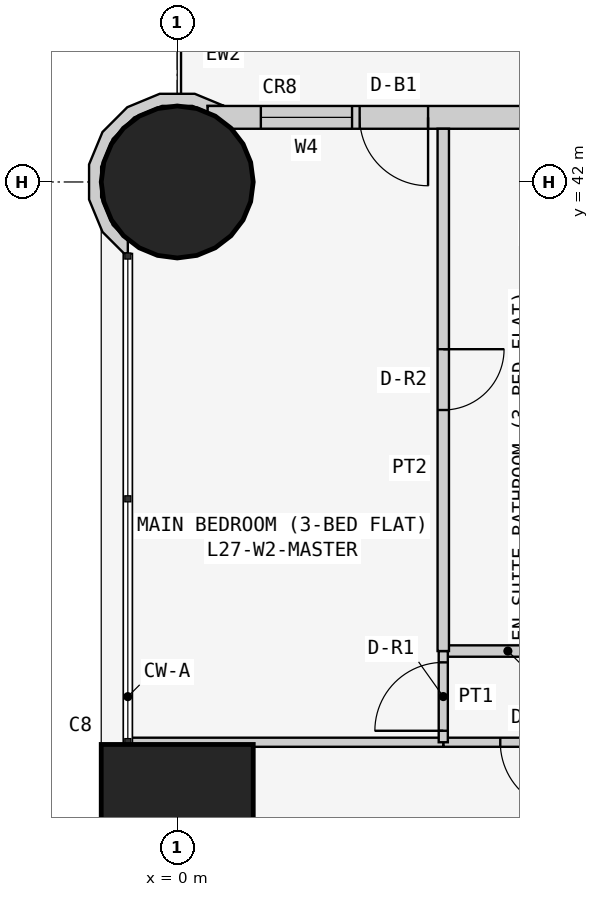
"""IFC4 building model, lengths in metres.
Left out: names, types, materials, properties, quantities, classifications, styles, units other than length and angle.
Written with IfcOpenShell. Run it as: python <this file> out.ifc"""

import sys

from ifc_helpers import new_model, si_unit, direction, frame, frame_2d, origin, origin_2d, place, context, subcontext, project, spatial, polyline, rectangle, circle, outline, extrude, element, fill, save


model = new_model("IFC4")
c1 = context("Model", 3, precision=1e-05, world=origin(), true_north=direction((0.0, 1.0)))
c2 = subcontext(c1, "Body", "Model", "MODEL_VIEW")
j1 = project(units=[si_unit("LENGTHUNIT", "METRE"), si_unit("PLANEANGLEUNIT", "RADIAN")], contexts=[c1])
p1 = place(None, origin())
s1 = spatial("IfcSite", under=j1, at=p1, CompositionType="ELEMENT")
p2 = place(p1, origin())
s2 = spatial("IfcBuilding", under=s1, at=p2, CompositionType="ELEMENT")
p3 = place(p2, frame((0.0, 0.0, 108.9)))
s3 = spatial("IfcBuildingStorey", under=s2, at=p3, CompositionType="ELEMENT", Elevation=108.9)
p4 = place(p3, frame((0.0, 33.6, 0.0), z_axis=(0.0, 0.0, 1.0), x_axis=(1.0, 0.0, 0.0)))
e1 = element("IfcColumn", 1, at=p4, inside=s3, PredefinedType="COLUMN", context=c2, shape_type="SweptSolid", body=[
    extrude(rectangle(XDim=2.0, YDim=2.0, at=origin_2d()), origin(), (0.0, 0.0, 1.0), 3.6),
])
p5 = place(p3, frame((0.0, 42.0, 0.0), z_axis=(0.0, 0.0, 1.0), x_axis=(1.0, 0.0, 0.0)))
e2 = element("IfcColumn", 2, at=p5, inside=s3, PredefinedType="COLUMN", context=c2, shape_type="SweptSolid", body=[
    extrude(circle(Radius=1.0, at=origin_2d()), origin(), (0.0, 0.0, 1.0), 3.6),
])
p6 = place(p3, frame((15.8, 42.85, 0.0), z_axis=(0.0, 0.0, 1.0), x_axis=(-1.0, 0.0, 0.0)))
e3 = element("IfcWall", 3, at=p6, inside=s3, PredefinedType="SOLIDWALL", context=c2, shape_type="SweptSolid", body=[
    extrude(rectangle(XDim=15.4, YDim=0.3, at=frame_2d((7.7, 0.0))), origin(), (0.0, 0.0, 1.0), 3.45),
])
p7 = place(p6, frame((1.2, 0.0, 0.9)))
e4 = element("IfcOpeningElement", 4, at=p7, cuts=e3, PredefinedType="OPENING", context=c2, shape_type="SweptSolid", body=[
    extrude(rectangle(XDim=1.8, YDim=1.5, at=frame_2d((0.9, 0.75))), frame((0.0, 0.16, 0.0), z_axis=(0.0, -1.0, 0.0), x_axis=(1.0, 0.0, 0.0)), (0.0, 0.0, 1.0), 0.32),
])
p8 = place(p6, frame((4.95, 0.0, 1.5)))
e5 = element("IfcOpeningElement", 5, at=p8, cuts=e3, PredefinedType="OPENING", context=c2, shape_type="SweptSolid", body=[
    extrude(rectangle(XDim=0.9, YDim=0.7, at=frame_2d((0.45, 0.35))), frame((0.0, 0.16, 0.0), z_axis=(0.0, -1.0, 0.0), x_axis=(1.0, 0.0, 0.0)), (0.0, 0.0, 1.0), 0.32),
])
p9 = place(p6, frame((8.5, 0.0, 0.9)))
e6 = element("IfcOpeningElement", 6, at=p9, cuts=e3, PredefinedType="OPENING", context=c2, shape_type="SweptSolid", body=[
    extrude(rectangle(XDim=1.8, YDim=1.5, at=frame_2d((0.9, 0.75))), frame((0.0, 0.16, 0.0), z_axis=(0.0, -1.0, 0.0), x_axis=(1.0, 0.0, 0.0)), (0.0, 0.0, 1.0), 0.32),
])
p10 = place(p6, frame((12.5, 0.0, 0.0)))
e7 = element("IfcOpeningElement", 7, at=p10, cuts=e3, PredefinedType="OPENING", context=c2, shape_type="SweptSolid", body=[
    extrude(rectangle(XDim=0.9, YDim=2.4, at=frame_2d((0.45, 1.2))), frame((0.0, 0.16, 0.0), z_axis=(0.0, -1.0, 0.0), x_axis=(1.0, 0.0, 0.0)), (0.0, 0.0, 1.0), 0.32),
])
p11 = place(p6, frame((13.5, 0.0, 0.9)))
e8 = element("IfcOpeningElement", 8, at=p11, cuts=e3, PredefinedType="OPENING", context=c2, shape_type="SweptSolid", body=[
    extrude(rectangle(XDim=1.2, YDim=1.5, at=frame_2d((0.6, 0.75))), frame((0.0, 0.16, 0.0), z_axis=(0.0, -1.0, 0.0), x_axis=(1.0, 0.0, 0.0)), (0.0, 0.0, 1.0), 0.32),
])
p12 = place(p3, frame((0.567, 42.919, 0.0), z_axis=(0.0, 0.0, 1.0), x_axis=(-0.831199417842, 0.555974394895, 0.0)))
e9 = element("IfcWall", 9, at=p12, inside=s3, PredefinedType="SOLIDWALL", context=c2, shape_type="SweptSolid", body=[
    extrude(outline(polyline([(0.004, -0.095), (0.413, -0.013), (0.797, 0.243), (1.053, 0.627), (1.143, 1.08), (1.053, 1.532), (0.796, 1.916), (0.412, 2.172), (0.017, 2.251), (-0.023, 2.224), (0.075, 2.077), (0.351, 2.022), (0.682, 1.801), (0.903, 1.47), (0.981, 1.08), (0.903, 0.689), (0.682, 0.358), (0.351, 0.137), (0.126, 0.092), (0.184, 0.026), (0.004, -0.095)])), origin(), (0.0, 0.0, 1.0), 3.45),
])
p13 = place(p3, frame((3.5, 34.629, 0.0), z_axis=(0.0, 0.0, 1.0), x_axis=(1.0, 0.0, 0.0)))
e10 = element("IfcWall", 10, at=p13, inside=s3, PredefinedType="PARTITIONING", context=c2, shape_type="SweptSolid", body=[
    extrude(rectangle(XDim=3.9, YDim=0.12, at=frame_2d((1.95, 0.0))), origin(), (0.0, 0.0, 1.0), 3.45),
])
p14 = place(p13, frame((0.75, 0.0, 0.0)))
e11 = element("IfcOpeningElement", 11, at=p14, cuts=e10, PredefinedType="OPENING", context=c2, shape_type="SweptSolid", body=[
    extrude(rectangle(XDim=0.9, YDim=2.1, at=frame_2d((0.45, 1.05))), frame((0.0, 0.07, 0.0), z_axis=(0.0, -1.0, 0.0), x_axis=(1.0, 0.0, 0.0)), (0.0, 0.0, 1.0), 0.14),
])
p15 = place(p3, frame((-0.65, 34.629, 0.0), z_axis=(0.0, 0.0, 1.0), x_axis=(1.0, 0.0, 0.0)))
e12 = element("IfcWall", 12, at=p15, inside=s3, PredefinedType="PARTITIONING", context=c2, shape_type="SweptSolid", body=[
    extrude(rectangle(XDim=4.15, YDim=0.12, at=frame_2d((2.075, 0.0))), origin(), (0.0, 0.0, 1.0), 3.45),
])
p16 = place(p3, frame((3.5, 35.829, 0.0), z_axis=(0.0, 0.0, 1.0), x_axis=(1.0, 0.0, 0.0)))
e13 = element("IfcWall", 13, at=p16, inside=s3, PredefinedType="PARTITIONING", context=c2, shape_type="SweptSolid", body=[
    extrude(rectangle(XDim=1.7, YDim=0.15, at=frame_2d((0.85, 0.0))), origin(), (0.0, 0.0, 1.0), 3.45),
])
p17 = place(p3, frame((3.5, 34.629, 0.0), z_axis=(0.0, 0.0, 1.0), x_axis=(0.0, 1.0, 0.0)))
e14 = element("IfcWall", 14, at=p17, inside=s3, PredefinedType="PARTITIONING", context=c2, shape_type="SweptSolid", body=[
    extrude(rectangle(XDim=1.2, YDim=0.12, at=frame_2d((0.6, 0.0))), origin(), (0.0, 0.0, 1.0), 3.45),
])
p18 = place(p17, frame((0.151, 0.0, 0.0)))
e15 = element("IfcOpeningElement", 15, at=p18, cuts=e14, PredefinedType="OPENING", context=c2, shape_type="SweptSolid", body=[
    extrude(rectangle(XDim=0.9, YDim=2.1, at=frame_2d((0.45, 1.05))), frame((0.0, 0.07, 0.0), z_axis=(0.0, -1.0, 0.0), x_axis=(1.0, 0.0, 0.0)), (0.0, 0.0, 1.0), 0.14),
])
p19 = place(p3, frame((3.5, 35.829, 0.0), z_axis=(0.0, 0.0, 1.0), x_axis=(0.0, 1.0, 0.0)))
e16 = element("IfcWall", 16, at=p19, inside=s3, PredefinedType="PARTITIONING", context=c2, shape_type="SweptSolid", body=[
    extrude(rectangle(XDim=6.871, YDim=0.15, at=frame_2d((3.436, 0.0))), origin(), (0.0, 0.0, 1.0), 3.45),
])
p20 = place(p19, frame((3.171, 0.0, 0.0)))
e17 = element("IfcOpeningElement", 17, at=p20, cuts=e16, PredefinedType="OPENING", context=c2, shape_type="SweptSolid", body=[
    extrude(rectangle(XDim=0.8, YDim=2.1, at=frame_2d((0.4, 1.05))), frame((0.0, 0.085, 0.0), z_axis=(0.0, -1.0, 0.0), x_axis=(1.0, 0.0, 0.0)), (0.0, 0.0, 1.0), 0.17),
])
p21 = place(p10, origin())
e18 = element("IfcDoor", 18, at=p21, inside=s3, OperationType="SINGLE_SWING_LEFT", PredefinedType="DOOR", context=c2, shape_type="SweptSolid", body=[
    extrude(rectangle(XDim=0.9, YDim=2.4, at=frame_2d((0.45, 1.2))), frame((0.0, 0.025, 0.0), z_axis=(0.0, -1.0, 0.0), x_axis=(1.0, 0.0, 0.0)), (0.0, 0.0, 1.0), 0.05),
])
fill(e7, e18)
p22 = place(p11, origin())
e19 = element("IfcWindow", 19, at=p22, inside=s3, PartitioningType="SINGLE_PANEL", PredefinedType="WINDOW", context=c2, shape_type="SweptSolid", body=[
    extrude(rectangle(XDim=1.2, YDim=1.5, at=frame_2d((0.6, 0.75))), frame((0.0, 0.03, 0.0), z_axis=(0.0, -1.0, 0.0), x_axis=(1.0, 0.0, 0.0)), (0.0, 0.0, 1.0), 0.06),
])
fill(e8, e19)
p23 = place(p14, frame((0.9, 0.0, 0.0), z_axis=(0.0, 0.0, 1.0), x_axis=(-1.0, 0.0, 0.0)))
e20 = element("IfcDoor", 20, at=p23, inside=s3, OperationType="SINGLE_SWING_LEFT", PredefinedType="DOOR", context=c2, shape_type="SweptSolid", body=[
    extrude(rectangle(XDim=0.9, YDim=2.1, at=frame_2d((0.45, 1.05))), frame((0.0, 0.025, 0.0), z_axis=(0.0, -1.0, 0.0), x_axis=(1.0, 0.0, 0.0)), (0.0, 0.0, 1.0), 0.05),
])
fill(e11, e20)
p24 = place(p18, origin())
e21 = element("IfcDoor", 21, at=p24, inside=s3, OperationType="SINGLE_SWING_LEFT", PredefinedType="DOOR", context=c2, shape_type="SweptSolid", body=[
    extrude(rectangle(XDim=0.9, YDim=2.1, at=frame_2d((0.45, 1.05))), frame((0.0, 0.025, 0.0), z_axis=(0.0, -1.0, 0.0), x_axis=(1.0, 0.0, 0.0)), (0.0, 0.0, 1.0), 0.05),
])
fill(e15, e21)
p25 = place(p20, frame((0.8, 0.0, 0.0), z_axis=(0.0, 0.0, 1.0), x_axis=(-1.0, 0.0, 0.0)))
e22 = element("IfcDoor", 22, at=p25, inside=s3, OperationType="SINGLE_SWING_LEFT", PredefinedType="DOOR", context=c2, shape_type="SweptSolid", body=[
    extrude(rectangle(XDim=0.8, YDim=2.1, at=frame_2d((0.4, 1.05))), frame((0.0, 0.025, 0.0), z_axis=(0.0, -1.0, 0.0), x_axis=(1.0, 0.0, 0.0)), (0.0, 0.0, 1.0), 0.05),
])
fill(e17, e22)
save(model, sys.argv[1])
